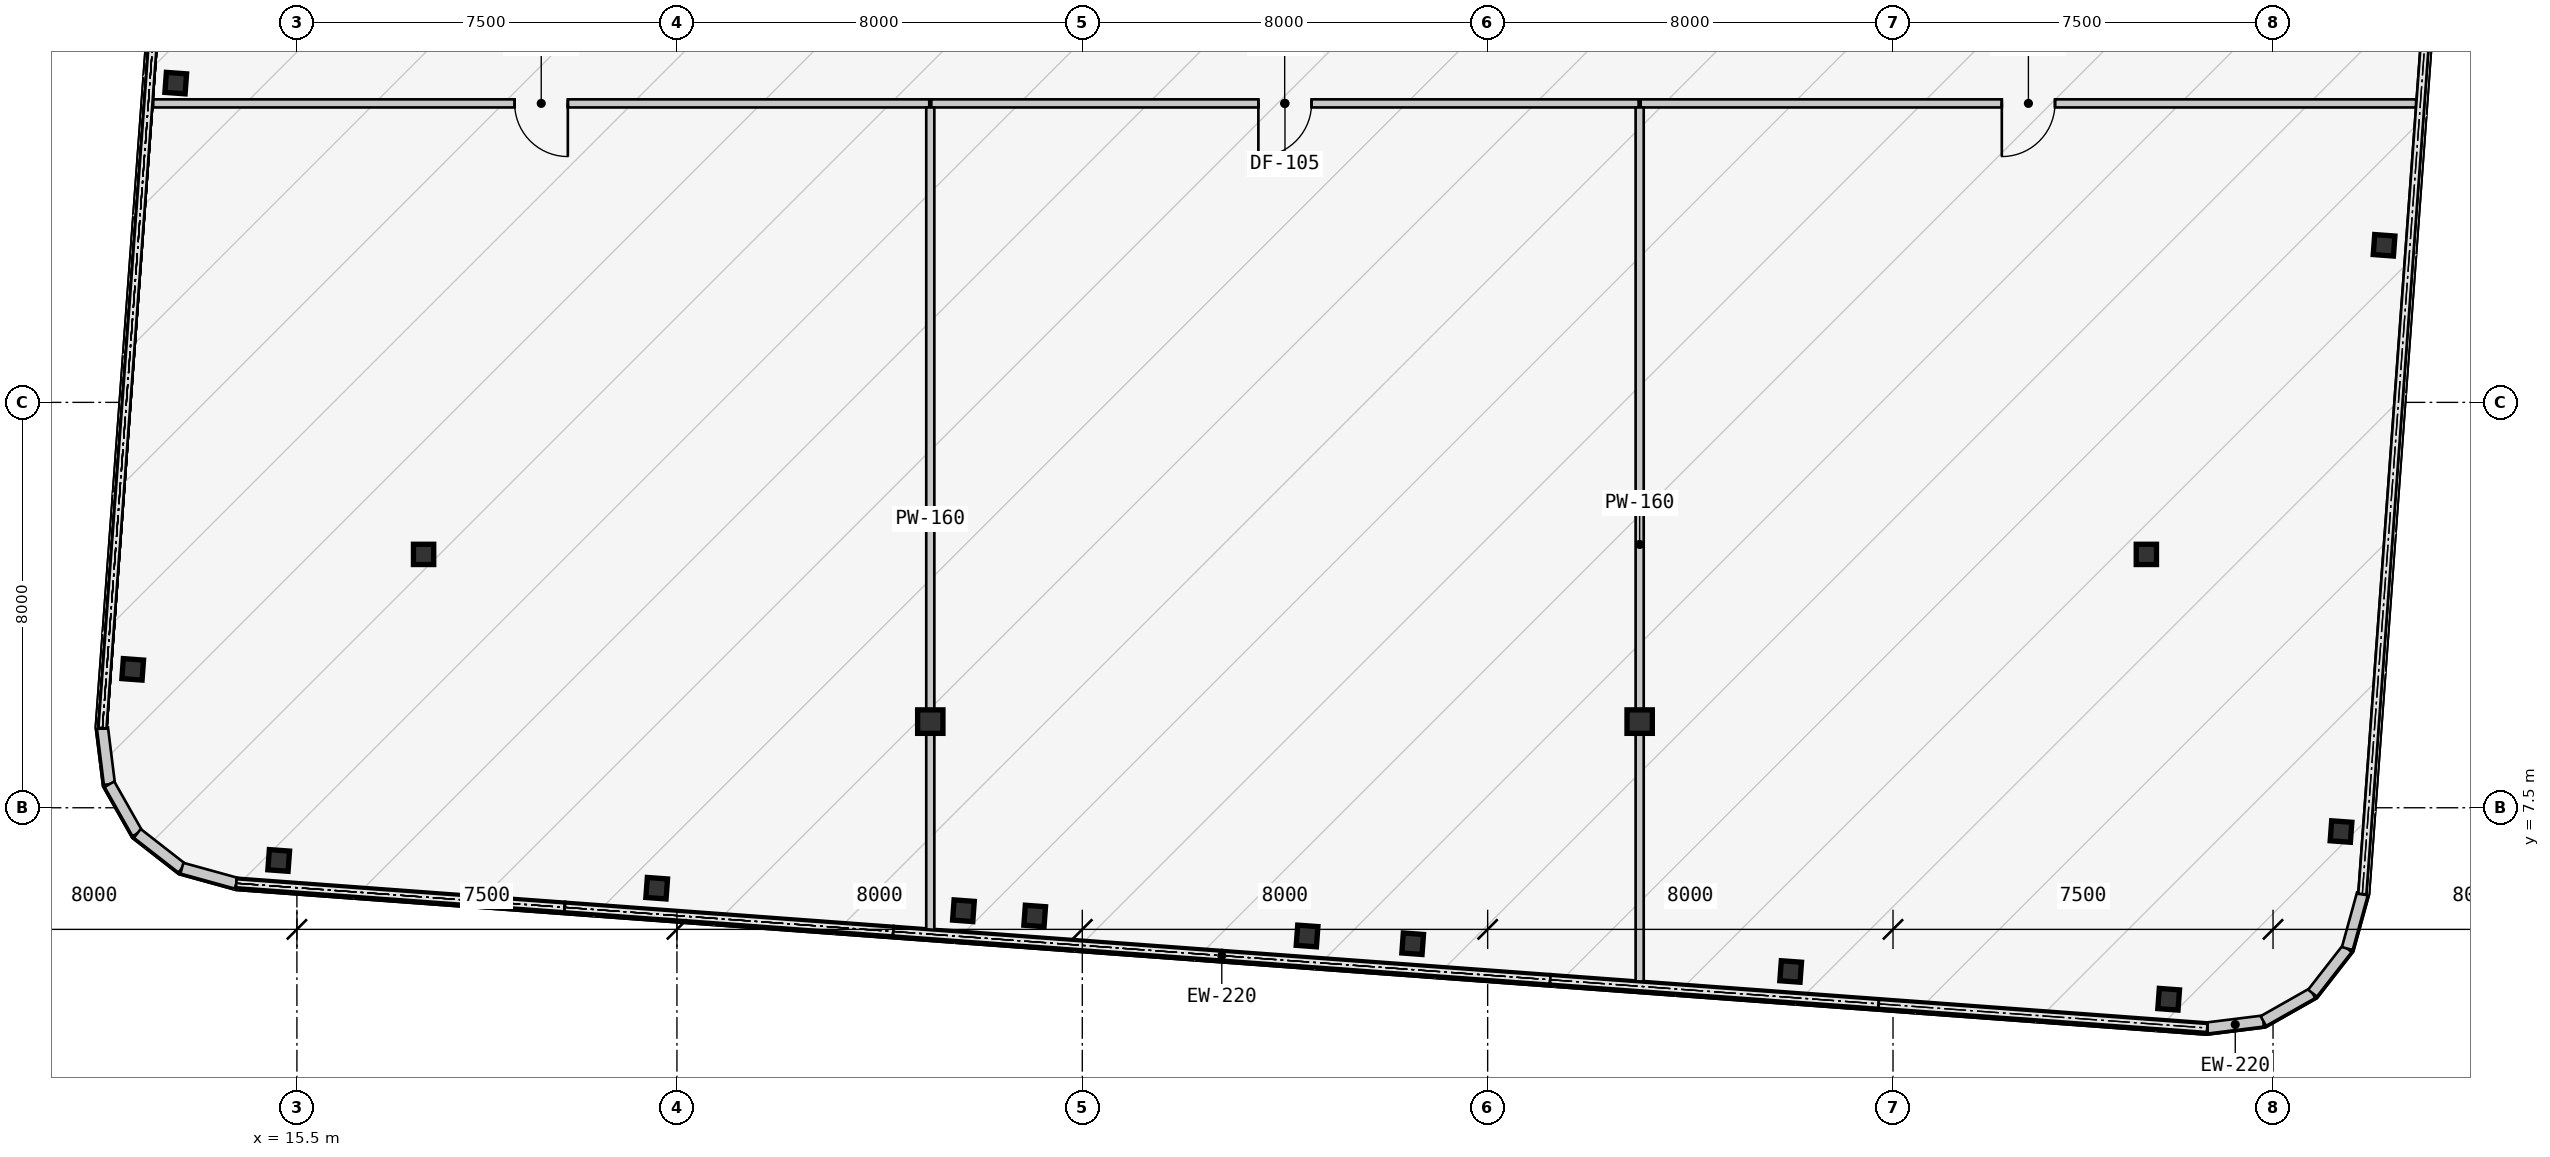
"""IFC4 building model, lengths in metres.
Left out: names, types, materials, properties, quantities, classifications, styles, units other than length and angle.
Written with IfcOpenShell. Run it as: python <this file> out.ifc"""

import sys

from ifc_helpers import new_model, si_unit, direction, frame, frame_2d, origin, origin_2d, place, context, subcontext, project, spatial, polyline, rectangle, hollow_rectangle, i_section, outline, extrude, source, transform, mapped, element, fill, save


model = new_model("IFC4")
c1 = context("Model", 3, precision=1e-05, world=origin(), true_north=direction((0.0, 1.0)))
c2 = subcontext(c1, "Body", "Model", "MODEL_VIEW")
j1 = project(units=[si_unit("LENGTHUNIT", "METRE"), si_unit("PLANEANGLEUNIT", "RADIAN")], contexts=[c1])
p1 = place(None, origin())
s1 = spatial("IfcSite", under=j1, at=p1, CompositionType="ELEMENT")
p2 = place(p1, origin())
s2 = spatial("IfcBuilding", under=s1, at=p2, CompositionType="ELEMENT")
p3 = place(p2, frame((0.0, 0.0, 253.05)))
s3 = spatial("IfcBuildingStorey", under=s2, at=p3, CompositionType="ELEMENT", Elevation=253.05)
m1 = source(origin(), c2, "Body", "SweptSolid", [
    extrude(i_section(OverallWidth=0.5, OverallDepth=0.464, WebThickness=0.022, FlangeThickness=0.034, at=origin_2d()), origin(), (0.0, 0.0, 1.0), 12.492),
])
p4 = place(p3, frame((28.0, 9.2, 0.0), z_axis=(0.0, 0.0, 1.0), x_axis=(1.0, 0.0, 0.0)))
e1 = element("IfcColumn", 1, at=p4, inside=s3, PredefinedType="COLUMN", context=c2, shape_type="MappedRepresentation", body=[
    mapped(m1, transform((0.0, 0.0, 0.0), scale=1.0)),
])
m2 = source(origin(), c2, "Body", "SweptSolid", [
    extrude(i_section(OverallWidth=0.5, OverallDepth=0.464, WebThickness=0.022, FlangeThickness=0.034, at=origin_2d()), origin(), (0.0, 0.0, 1.0), 8.489),
])
p5 = place(p3, frame((42.0, 9.2, 0.0), z_axis=(0.0, 0.0, 1.0), x_axis=(1.0, 0.0, 0.0)))
e2 = element("IfcColumn", 2, at=p5, inside=s3, PredefinedType="COLUMN", context=c2, shape_type="MappedRepresentation", body=[
    mapped(m2, transform((0.0, 0.0, 0.0), scale=1.0)),
])
m3 = source(origin(), c2, "Body", "SweptSolid", [
    extrude(hollow_rectangle(XDim=0.4, YDim=0.4, WallThickness=0.016, at=origin_2d()), origin(), (0.0, 0.0, 1.0), 15.42),
])
p6 = place(p3, frame((18.0, 12.5, 0.0), z_axis=(0.0, 0.0, 1.0), x_axis=(1.0, 0.0, 0.0)))
e3 = element("IfcColumn", 3, at=p6, inside=s3, PredefinedType="COLUMN", context=c2, shape_type="MappedRepresentation", body=[
    mapped(m3, transform((0.0, 0.0, 0.0), scale=1.0)),
])
m4 = source(origin(), c2, "Body", "SweptSolid", [
    extrude(hollow_rectangle(XDim=0.4, YDim=0.4, WallThickness=0.016, at=origin_2d()), origin(), (0.0, 0.0, 1.0), 5.699),
])
p7 = place(p3, frame((52.0, 12.5, 0.0), z_axis=(0.0, 0.0, 1.0), x_axis=(1.0, 0.0, 0.0)))
e4 = element("IfcColumn", 4, at=p7, inside=s3, PredefinedType="COLUMN", context=c2, shape_type="MappedRepresentation", body=[
    mapped(m4, transform((0.0, 0.0, 0.0), scale=1.0)),
])
m5 = source(origin(), c2, "Body", "SweptSolid", [
    extrude(hollow_rectangle(XDim=0.4, YDim=0.4, WallThickness=0.016, at=origin_2d()), origin(), (0.0, 0.0, 1.0), 16.111),
])
p8 = place(p3, frame((15.141, 6.46, 0.0), z_axis=(0.0, 0.0, 1.0), x_axis=(0.997314477224, -0.073238197128, 0.0)))
e5 = element("IfcColumn", 5, at=p8, inside=s3, PredefinedType="COLUMN", context=c2, shape_type="MappedRepresentation", body=[
    mapped(m5, transform((0.0, 0.0, 0.0), scale=1.0)),
])
m6 = source(origin(), c2, "Body", "SweptSolid", [
    extrude(i_section(OverallWidth=0.4, OverallDepth=0.396, WebThickness=0.022, FlangeThickness=0.034, at=origin_2d()), origin(), (0.0, 0.0, 1.0), 13.966),
])
p9 = place(p3, frame((22.601, 5.912, 0.0), z_axis=(0.0, 0.0, 1.0), x_axis=(0.997314477224, -0.073238197128, 0.0)))
e6 = element("IfcColumn", 6, at=p9, inside=s3, PredefinedType="COLUMN", context=c2, shape_type="MappedRepresentation", body=[
    mapped(m6, transform((0.0, 0.0, 0.0), scale=1.0)),
])
m7 = source(origin(), c2, "Body", "SweptSolid", [
    extrude(i_section(OverallWidth=0.4, OverallDepth=0.396, WebThickness=0.022, FlangeThickness=0.034, at=origin_2d()), origin(), (0.0, 0.0, 1.0), 11.822),
])
p10 = place(p3, frame((30.061, 5.365, 0.0), z_axis=(0.0, 0.0, 1.0), x_axis=(0.997314477224, -0.073238197128, 0.0)))
e7 = element("IfcColumn", 7, at=p10, inside=s3, PredefinedType="COLUMN", context=c2, shape_type="MappedRepresentation", body=[
    mapped(m7, transform((0.0, 0.0, 0.0), scale=1.0)),
])
m8 = source(origin(), c2, "Body", "SweptSolid", [
    extrude(i_section(OverallWidth=0.4, OverallDepth=0.396, WebThickness=0.022, FlangeThickness=0.034, at=origin_2d()), origin(), (0.0, 0.0, 1.0), 9.678),
])
p11 = place(p3, frame((37.521, 4.817, 0.0), z_axis=(0.0, 0.0, 1.0), x_axis=(0.997314477224, -0.073238197128, 0.0)))
e8 = element("IfcColumn", 8, at=p11, inside=s3, PredefinedType="COLUMN", context=c2, shape_type="MappedRepresentation", body=[
    mapped(m8, transform((0.0, 0.0, 0.0), scale=1.0)),
])
m9 = source(origin(), c2, "Body", "SweptSolid", [
    extrude(i_section(OverallWidth=0.4, OverallDepth=0.396, WebThickness=0.022, FlangeThickness=0.034, at=origin_2d()), origin(), (0.0, 0.0, 1.0), 7.533),
])
p12 = place(p3, frame((44.98, 4.269, 0.0), z_axis=(0.0, 0.0, 1.0), x_axis=(0.997314477224, -0.073238197128, 0.0)))
e9 = element("IfcColumn", 9, at=p12, inside=s3, PredefinedType="COLUMN", context=c2, shape_type="MappedRepresentation", body=[
    mapped(m9, transform((0.0, 0.0, 0.0), scale=1.0)),
])
m10 = source(origin(), c2, "Body", "SweptSolid", [
    extrude(hollow_rectangle(XDim=0.4, YDim=0.4, WallThickness=0.016, at=origin_2d()), origin(), (0.0, 0.0, 1.0), 5.389),
])
p13 = place(p3, frame((52.44, 3.721, 0.0), z_axis=(0.0, 0.0, 1.0), x_axis=(0.997314477224, -0.073238197128, 0.0)))
e10 = element("IfcColumn", 10, at=p13, inside=s3, PredefinedType="COLUMN", context=c2, shape_type="MappedRepresentation", body=[
    mapped(m10, transform((0.0, 0.0, 0.0), scale=1.0)),
])
m11 = source(origin(), c2, "Body", "SweptSolid", [
    extrude(i_section(OverallWidth=0.4, OverallDepth=0.396, WebThickness=0.022, FlangeThickness=0.034, at=origin_2d()), origin(), (0.0, 0.0, 1.0), 17.014),
])
for number, where, z_axis, x_axis in (
    (11, (12.259, 10.231, 0.0), (0.0, 0.0, 1.0), (0.997, -0.073, 0.0)),
    (12, (13.109, 21.8, 0.0), (0.0, 0.0, 1.0), (0.997, -0.073, 0.0)),
):
    element("IfcColumn", number, at=place(p3, frame(where, z_axis=z_axis, x_axis=x_axis)), inside=s3, PredefinedType="COLUMN", context=c2, shape_type="MappedRepresentation", body=[
        mapped(m11, transform((0.0, 0.0, 0.0), scale=1.0)),
    ])
m12 = source(origin(), c2, "Body", "SweptSolid", [
    extrude(i_section(OverallWidth=0.4, OverallDepth=0.396, WebThickness=0.022, FlangeThickness=0.034, at=origin_2d()), origin(), (0.0, 0.0, 1.0), 4.486),
])
for number, where, z_axis, x_axis in (
    (13, (55.842, 7.031, 0.0), (0.0, 0.0, 1.0), (0.997, -0.073, 0.0)),
    (14, (56.691, 18.6, 0.0), (0.0, 0.0, 1.0), (0.997, -0.073, 0.0)),
):
    element("IfcColumn", number, at=place(p3, frame(where, z_axis=z_axis, x_axis=x_axis)), inside=s3, PredefinedType="COLUMN", context=c2, shape_type="MappedRepresentation", body=[
        mapped(m12, transform((0.0, 0.0, 0.0), scale=1.0)),
    ])
m13 = source(origin(), c2, "Body", "SweptSolid", [
    extrude(hollow_rectangle(XDim=0.4, YDim=0.4, WallThickness=0.016, at=origin_2d()), origin(), (0.0, 0.0, 1.0), 12.226),
])
p14 = place(p3, frame((28.654, 5.468, 0.0), z_axis=(0.0, 0.0, 1.0), x_axis=(0.997314477224, -0.073238197128, 0.0)))
e15 = element("IfcColumn", 15, at=p14, inside=s3, PredefinedType="COLUMN", context=c2, shape_type="MappedRepresentation", body=[
    mapped(m13, transform((0.0, 0.0, 0.0), scale=1.0)),
])
m14 = source(origin(), c2, "Body", "SweptSolid", [
    extrude(hollow_rectangle(XDim=0.4, YDim=0.4, WallThickness=0.016, at=origin_2d()), origin(), (0.0, 0.0, 1.0), 10.277),
])
p15 = place(p3, frame((35.436, 4.97, 0.0), z_axis=(0.0, 0.0, 1.0), x_axis=(0.997314477224, -0.073238197128, 0.0)))
e16 = element("IfcColumn", 16, at=p15, inside=s3, PredefinedType="COLUMN", context=c2, shape_type="MappedRepresentation", body=[
    mapped(m14, transform((0.0, 0.0, 0.0), scale=1.0)),
])
p16 = place(p3, frame((53.201, 3.154, 0.0), z_axis=(0.0, 0.0, 1.0), x_axis=(0.992438604032, 0.122742076028, 0.0)))
e17 = element("IfcWall", 17, at=p16, inside=s3, PredefinedType="SOLIDWALL", context=c2, shape_type="SweptSolid", body=[
    extrude(outline(polyline([(0.0, 0.0), (1.116, 0.0), (1.116, 4.804), (0.0, 5.118), (0.0, 0.0)])), frame((0.0, 0.11, 0.0), z_axis=(0.0, -1.0, 0.0), x_axis=(1.0, 0.0, 0.0)), (0.0, 0.0, 1.0), 0.22),
])
p17 = place(p3, frame((54.308, 3.291, 0.0), z_axis=(0.0, 0.0, 1.0), x_axis=(0.869893934693, 0.49323882895, 0.0)))
e18 = element("IfcWall", 18, at=p17, inside=s3, PredefinedType="SOLIDWALL", context=c2, shape_type="SweptSolid", body=[
    extrude(outline(polyline([(0.0, 0.0), (1.116, 0.0), (1.116, 4.538), (0.0, 4.804), (0.0, 0.0)])), frame((0.0, 0.11, 0.0), z_axis=(0.0, -1.0, 0.0), x_axis=(1.0, 0.0, 0.0)), (0.0, 0.0, 1.0), 0.22),
])
p18 = place(p3, frame((55.279, 3.841, 0.0), z_axis=(0.0, 0.0, 1.0), x_axis=(0.615015475096, 0.788515038152, 0.0)))
e19 = element("IfcWall", 19, at=p18, inside=s3, PredefinedType="SOLIDWALL", context=c2, shape_type="SweptSolid", body=[
    extrude(outline(polyline([(0.0, 0.0), (1.116, 0.0), (1.116, 4.36), (0.0, 4.538), (0.0, 0.0)])), frame((0.0, 0.11, 0.0), z_axis=(0.0, -1.0, 0.0), x_axis=(1.0, 0.0, 0.0)), (0.0, 0.0, 1.0), 0.22),
])
p19 = place(p3, frame((55.965, 4.721, 0.0), z_axis=(0.0, 0.0, 1.0), x_axis=(0.26624444942, 0.963905541613, 0.0)))
e20 = element("IfcWall", 20, at=p19, inside=s3, PredefinedType="SOLIDWALL", context=c2, shape_type="SweptSolid", body=[
    extrude(outline(polyline([(0.0, 0.0), (1.116, 0.0), (1.116, 4.298), (0.0, 4.36), (0.0, 0.0)])), frame((0.0, 0.11, 0.0), z_axis=(0.0, -1.0, 0.0), x_axis=(1.0, 0.0, 0.0)), (0.0, 0.0, 1.0), 0.22),
])
p20 = place(p3, frame((11.663, 9.072, 0.0), z_axis=(0.0, 0.0, 1.0), x_axis=(0.122742076028, -0.992438604032, 0.0)))
e21 = element("IfcWall", 21, at=p20, inside=s3, PredefinedType="SOLIDWALL", context=c2, shape_type="SweptSolid", body=[
    extrude(outline(polyline([(0.0, 0.0), (1.116, 0.0), (1.116, 17.055), (0.0, 17.118), (0.0, 0.0)])), frame((0.0, 0.11, 0.0), z_axis=(0.0, -1.0, 0.0), x_axis=(1.0, 0.0, 0.0)), (0.0, 0.0, 1.0), 0.22),
])
p21 = place(p3, frame((11.8, 7.965, 0.0), z_axis=(0.0, 0.0, 1.0), x_axis=(0.493073284892, -0.869987779067, 0.0)))
e22 = element("IfcWall", 22, at=p21, inside=s3, PredefinedType="SOLIDWALL", context=c2, shape_type="SweptSolid", body=[
    extrude(outline(polyline([(0.0, 0.0), (1.116, 0.0), (1.116, 16.878), (0.0, 17.055), (0.0, 0.0)])), frame((0.0, 0.11, 0.0), z_axis=(0.0, -1.0, 0.0), x_axis=(1.0, 0.0, 0.0)), (0.0, 0.0, 1.0), 0.22),
])
p22 = place(p3, frame((12.35, 6.994, 0.0), z_axis=(0.0, 0.0, 1.0), x_axis=(0.788597772321, -0.614909386406, 0.0)))
e23 = element("IfcWall", 23, at=p22, inside=s3, PredefinedType="SOLIDWALL", context=c2, shape_type="SweptSolid", body=[
    extrude(outline(polyline([(0.0, 0.0), (1.116, 0.0), (1.116, 16.612), (0.0, 16.878), (0.0, 0.0)])), frame((0.0, 0.11, 0.0), z_axis=(0.0, -1.0, 0.0), x_axis=(1.0, 0.0, 0.0)), (0.0, 0.0, 1.0), 0.22),
])
p23 = place(p3, frame((13.23, 6.307, 0.0), z_axis=(0.0, 0.0, 1.0), x_axis=(0.963890028874, -0.266300605026, 0.0)))
e24 = element("IfcWall", 24, at=p23, inside=s3, PredefinedType="SOLIDWALL", context=c2, shape_type="SweptSolid", body=[
    extrude(outline(polyline([(0.0, 0.0), (1.116, 0.0), (1.116, 16.298), (0.0, 16.612), (0.0, 0.0)])), frame((0.0, 0.11, 0.0), z_axis=(0.0, -1.0, 0.0), x_axis=(1.0, 0.0, 0.0)), (0.0, 0.0, 1.0), 0.22),
])
p24 = place(p3, frame((14.305, 6.01, 14.241), z_axis=(0.0, 0.0, 1.0), x_axis=(0.997314286366, -0.073240796084, 0.0)))
e25 = element("IfcWall", 25, at=p24, inside=s3, PredefinedType="SOLIDWALL", context=c2, shape_type="SweptSolid", body=[
    extrude(outline(polyline([(0.0, 0.0), (6.5, 0.0), (6.5, 0.22), (0.0, 2.083), (0.0, 0.0)])), frame((0.0, 0.11, 0.0), z_axis=(0.0, -1.0, 0.0), x_axis=(1.0, 0.0, 0.0)), (0.0, 0.0, 1.0), 0.22),
])
p25 = place(p3, frame((20.788, 5.534, 12.378), z_axis=(0.0, 0.0, 1.0), x_axis=(0.997314084878, -0.073243539677, 0.0)))
e26 = element("IfcWall", 26, at=p25, inside=s3, PredefinedType="SOLIDWALL", context=c2, shape_type="SweptSolid", body=[
    extrude(outline(polyline([(0.0, 0.0), (6.5, 0.0), (6.5, 0.22), (0.0, 2.083), (0.0, 0.0)])), frame((0.0, 0.11, 0.0), z_axis=(0.0, -1.0, 0.0), x_axis=(1.0, 0.0, 0.0)), (0.0, 0.0, 1.0), 0.22),
])
p26 = place(p3, frame((27.271, 5.058, 10.515), z_axis=(0.0, 0.0, 1.0), x_axis=(0.997314286366, -0.073240796084, 0.0)))
e27 = element("IfcWall", 27, at=p26, inside=s3, PredefinedType="SOLIDWALL", context=c2, shape_type="SweptSolid", body=[
    extrude(outline(polyline([(0.0, 0.0), (6.5, 0.0), (6.5, 0.22), (0.0, 2.083), (0.0, 0.0)])), frame((0.0, 0.11, 0.0), z_axis=(0.0, -1.0, 0.0), x_axis=(1.0, 0.0, 0.0)), (0.0, 0.0, 1.0), 0.22),
])
p27 = place(p3, frame((33.753, 4.582, 8.652), z_axis=(0.0, 0.0, 1.0), x_axis=(0.997314084878, -0.073243539677, 0.0)))
e28 = element("IfcWall", 28, at=p27, inside=s3, PredefinedType="SOLIDWALL", context=c2, shape_type="SweptSolid", body=[
    extrude(outline(polyline([(0.0, 0.0), (6.5, 0.0), (6.5, 0.22), (0.0, 2.083), (0.0, 0.0)])), frame((0.0, 0.11, 0.0), z_axis=(0.0, -1.0, 0.0), x_axis=(1.0, 0.0, 0.0)), (0.0, 0.0, 1.0), 0.22),
])
p28 = place(p3, frame((40.236, 4.106, 6.788), z_axis=(0.0, 0.0, 1.0), x_axis=(0.997314286366, -0.073240796084, 0.0)))
e29 = element("IfcWall", 29, at=p28, inside=s3, PredefinedType="SOLIDWALL", context=c2, shape_type="SweptSolid", body=[
    extrude(outline(polyline([(0.0, 0.0), (6.5, 0.0), (6.5, 0.22), (0.0, 2.083), (0.0, 0.0)])), frame((0.0, 0.11, 0.0), z_axis=(0.0, -1.0, 0.0), x_axis=(1.0, 0.0, 0.0)), (0.0, 0.0, 1.0), 0.22),
])
p29 = place(p3, frame((46.718, 3.63, 4.925), z_axis=(0.0, 0.0, 1.0), x_axis=(0.997314084878, -0.073243539677, 0.0)))
e30 = element("IfcWall", 30, at=p29, inside=s3, PredefinedType="SOLIDWALL", context=c2, shape_type="SweptSolid", body=[
    extrude(outline(polyline([(0.0, 0.0), (6.5, 0.0), (6.5, 0.22), (0.0, 2.083), (0.0, 0.0)])), frame((0.0, 0.11, 0.0), z_axis=(0.0, -1.0, 0.0), x_axis=(1.0, 0.0, 0.0)), (0.0, 0.0, 1.0), 0.22),
])
m15 = source(origin(), c2, "Body", "SweptSolid", [
    extrude(rectangle(XDim=13.959, YDim=0.16, at=frame_2d((6.98, 0.0))), origin(), (0.0, 0.0, 1.0), 4.3),
])
p30 = place(p3, frame((41.98, 21.4, 0.0), z_axis=(0.0, 0.0, 1.0), x_axis=(-1.0, 0.0, 0.0)))
e31 = element("IfcWall", 31, at=p30, inside=s3, PredefinedType="PARTITIONING", context=c2, shape_type="MappedRepresentation", body=[
    mapped(m15, transform((0.0, 0.0, 0.0), scale=1.0)),
])
m16 = source(origin(), c2, "Body", "SweptSolid", [
    extrude(rectangle(XDim=1.05, YDim=2.1, at=frame_2d((0.525, 1.05))), frame((0.0, 0.09, 0.0), z_axis=(0.0, -1.0, 0.0), x_axis=(1.0, 0.0, 0.0)), (0.0, 0.0, 1.0), 0.18),
])
p31 = place(p30, frame((6.455, 0.0, 0.0)))
e32 = element("IfcOpeningElement", 32, at=p31, cuts=e31, PredefinedType="OPENING", context=c2, shape_type="MappedRepresentation", body=[
    mapped(m16, transform((0.0, 0.0, 0.0), scale=1.0)),
])
m17 = source(origin(), c2, "Body", "SweptSolid", [
    extrude(rectangle(XDim=15.316, YDim=0.16, at=frame_2d((7.658, 0.0))), origin(), (0.0, 0.0, 1.0), 4.3),
])
p32 = place(p3, frame((27.98, 21.4, 0.0), z_axis=(0.0, 0.0, 1.0), x_axis=(-1.0, 0.0, 0.0)))
e33 = element("IfcWall", 33, at=p32, inside=s3, PredefinedType="PARTITIONING", context=c2, shape_type="MappedRepresentation", body=[
    mapped(m17, transform((0.0, 0.0, 0.0), scale=1.0)),
])
p33 = place(p32, frame((7.133, 0.0, 0.0)))
e34 = element("IfcOpeningElement", 34, at=p33, cuts=e33, PredefinedType="OPENING", context=c2, shape_type="MappedRepresentation", body=[
    mapped(m16, transform((0.0, 0.0, 0.0), scale=1.0)),
])
m18 = source(origin(), c2, "Body", "SweptSolid", [
    extrude(rectangle(XDim=15.304, YDim=0.16, at=frame_2d((7.652, 0.0))), origin(), (0.0, 0.0, 1.0), 4.3),
])
p34 = place(p3, frame((57.324, 21.4, 0.0), z_axis=(0.0, 0.0, 1.0), x_axis=(-1.0, 0.0, 0.0)))
e35 = element("IfcWall", 35, at=p34, inside=s3, PredefinedType="PARTITIONING", context=c2, shape_type="MappedRepresentation", body=[
    mapped(m18, transform((0.0, 0.0, 0.0), scale=1.0)),
])
p35 = place(p34, frame((7.127, 0.0, 0.0)))
e36 = element("IfcOpeningElement", 36, at=p35, cuts=e35, PredefinedType="OPENING", context=c2, shape_type="MappedRepresentation", body=[
    mapped(m16, transform((0.0, 0.0, 0.0), scale=1.0)),
])
m19 = source(origin(), c2, "Body", "SweptSolid", [
    extrude(rectangle(XDim=16.231, YDim=0.16, at=frame_2d((8.116, 0.0))), origin(), (0.0, 0.0, 1.0), 4.3),
])
p36 = place(p3, frame((28.0, 5.089, 0.0), z_axis=(0.0, 0.0, 1.0), x_axis=(0.0, 1.0, 0.0)))
e37 = element("IfcWall", 37, at=p36, inside=s3, PredefinedType="PARTITIONING", context=c2, shape_type="MappedRepresentation", body=[
    mapped(m19, transform((0.0, 0.0, 0.0), scale=1.0)),
])
m20 = source(origin(), c2, "Body", "SweptSolid", [
    extrude(rectangle(XDim=17.248, YDim=0.16, at=frame_2d((8.624, 0.0))), origin(), (0.0, 0.0, 1.0), 4.3),
])
p37 = place(p3, frame((42.0, 21.32, 0.0), z_axis=(0.0, 0.0, 1.0), x_axis=(0.0, -1.0, 0.0)))
e38 = element("IfcWall", 38, at=p37, inside=s3, PredefinedType="PARTITIONING", context=c2, shape_type="MappedRepresentation", body=[
    mapped(m20, transform((0.0, 0.0, 0.0), scale=1.0)),
])
m21 = source(origin(), c2, "Body", "SweptSolid", [
    extrude(rectangle(XDim=1.05, YDim=2.1, at=frame_2d((0.525, 1.05))), frame((0.0, 0.025, 0.0), z_axis=(0.0, -1.0, 0.0), x_axis=(1.0, 0.0, 0.0)), (0.0, 0.0, 1.0), 0.05),
])
p38 = place(p31, origin())
e39 = element("IfcDoor", 39, at=p38, inside=s3, OperationType="SINGLE_SWING_RIGHT", PredefinedType="DOOR", context=c2, shape_type="MappedRepresentation", body=[
    mapped(m21, transform((0.0, 0.0, 0.0), scale=1.0)),
])
fill(e32, e39)
p39 = place(p33, origin())
e40 = element("IfcDoor", 40, at=p39, inside=s3, OperationType="SINGLE_SWING_LEFT", PredefinedType="DOOR", context=c2, shape_type="MappedRepresentation", body=[
    mapped(m21, transform((0.0, 0.0, 0.0), scale=1.0)),
])
fill(e34, e40)
p40 = place(p35, origin())
e41 = element("IfcDoor", 41, at=p40, inside=s3, OperationType="SINGLE_SWING_RIGHT", PredefinedType="DOOR", context=c2, shape_type="MappedRepresentation", body=[
    mapped(m21, transform((0.0, 0.0, 0.0), scale=1.0)),
])
fill(e36, e41)
save(model, sys.argv[1])
